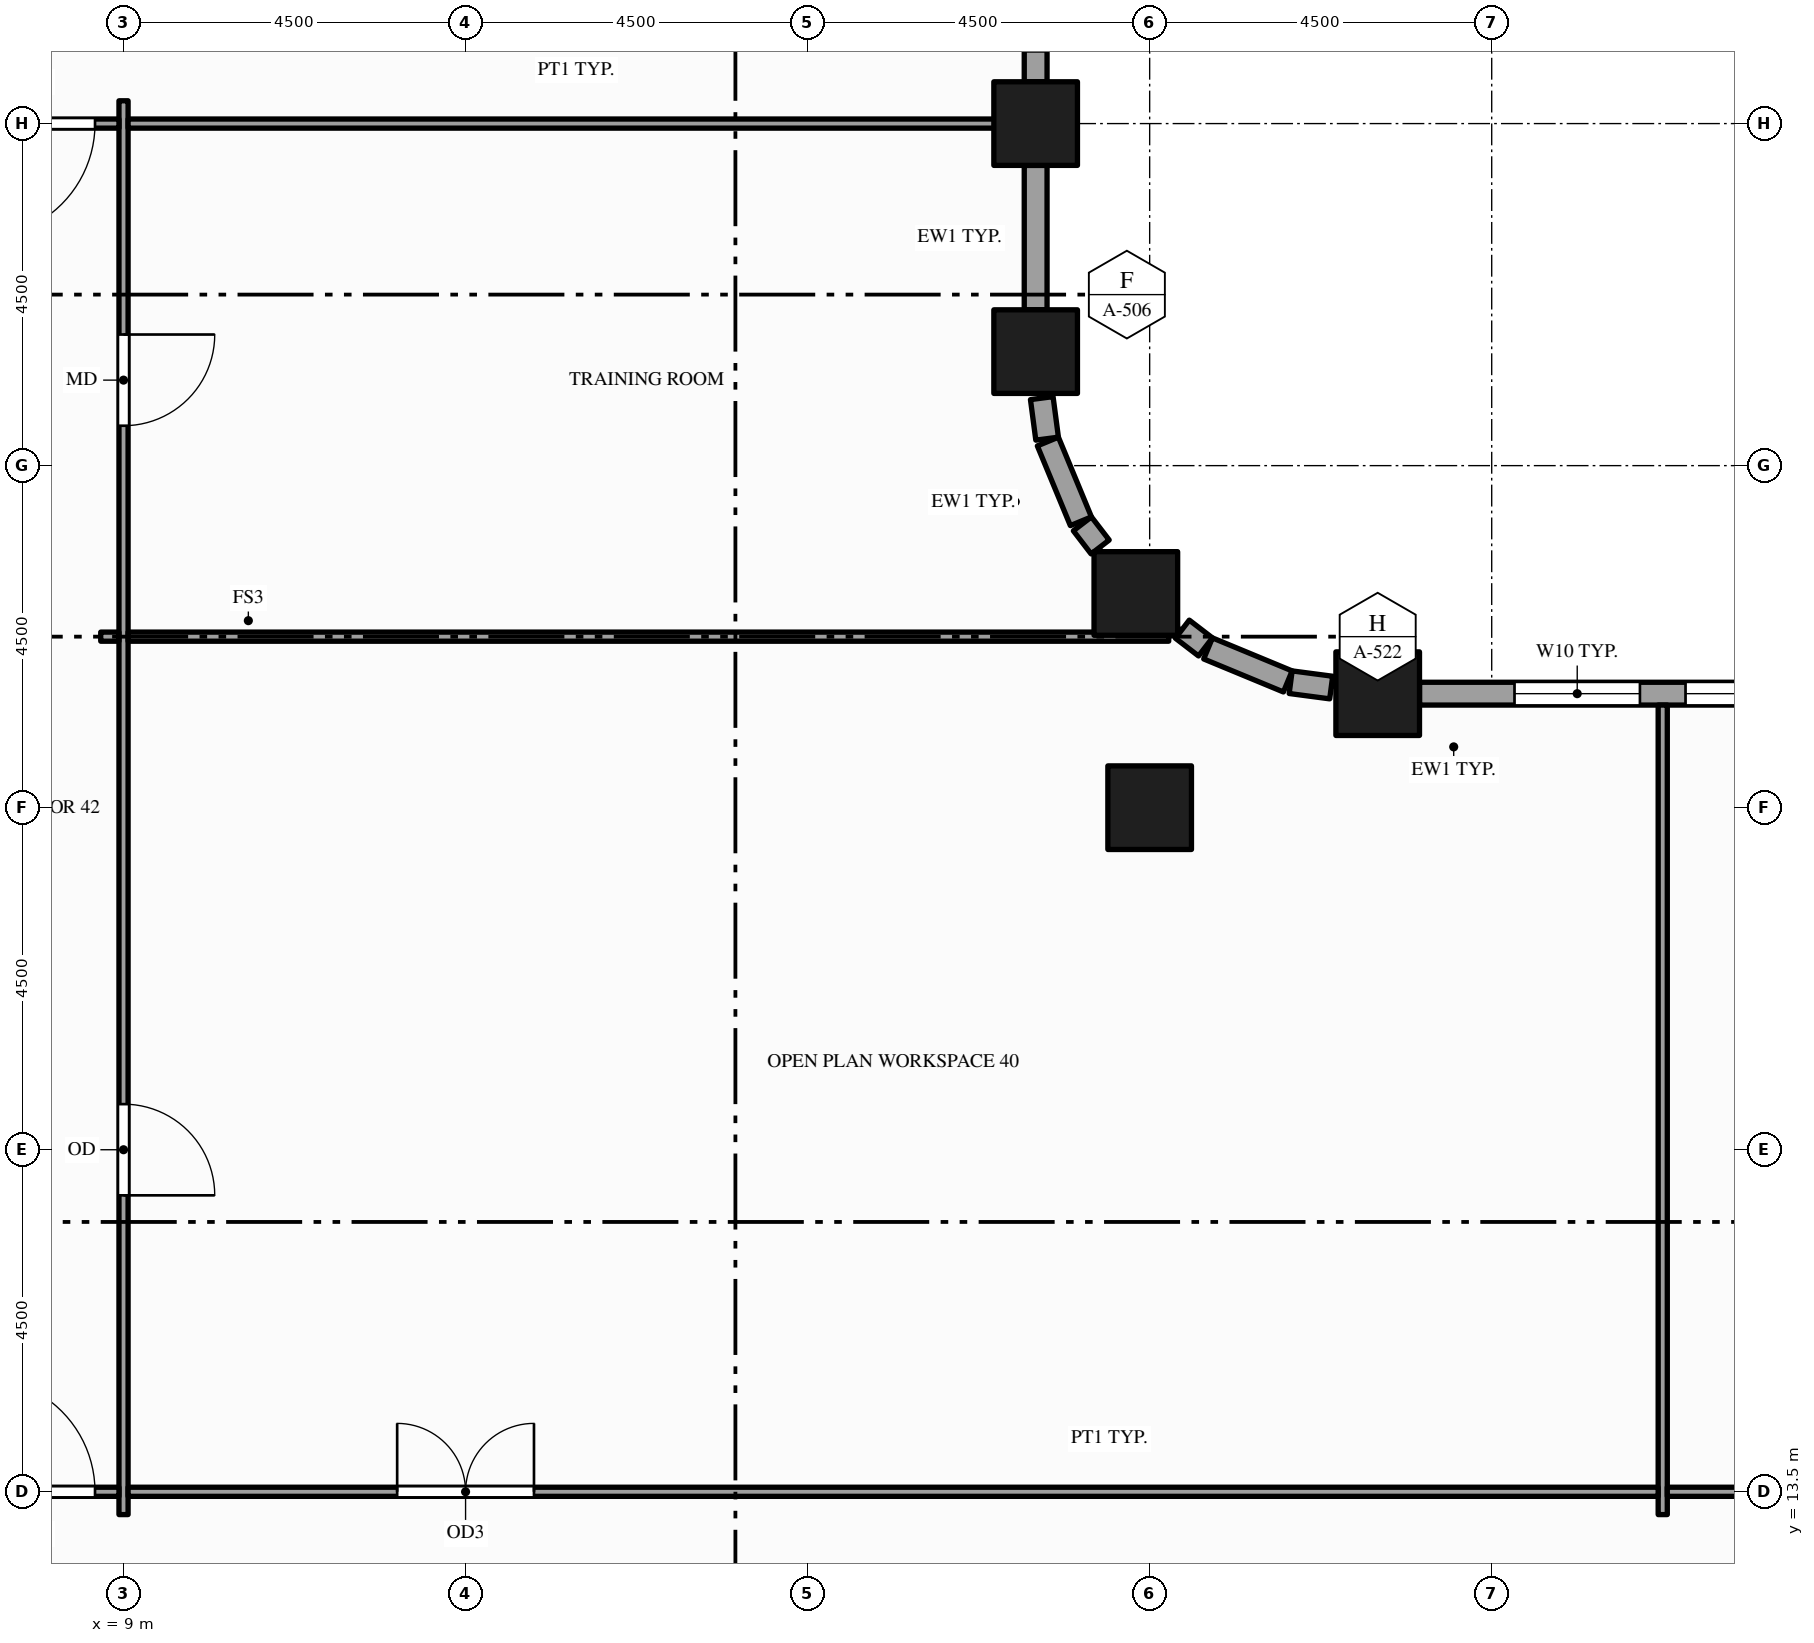
"""IFC4 building model, lengths in metres.
Left out: names, types, materials, properties, quantities, classifications, styles, units other than length and angle.
Written with IfcOpenShell. Run it as: python <this file> out.ifc"""

import sys

from ifc_helpers import new_model, si_unit, direction, frame, frame_2d, origin, origin_2d, place, context, subcontext, project, spatial, rectangle, hollow_rectangle, extrude, element, fill, save


model = new_model("IFC4")
c1 = context("Model", 3, precision=1e-05, world=origin(), true_north=direction((0.0, 1.0)))
c2 = subcontext(c1, "Body", "Model", "MODEL_VIEW")
j1 = project(units=[si_unit("LENGTHUNIT", "METRE"), si_unit("PLANEANGLEUNIT", "RADIAN")], contexts=[c1])
p1 = place(None, origin())
s1 = spatial("IfcSite", under=j1, at=p1, CompositionType="ELEMENT")
p2 = place(p1, origin())
s2 = spatial("IfcBuilding", under=s1, at=p2, CompositionType="ELEMENT")
p3 = place(p2, frame((0.0, 0.0, 41.0)))
s3 = spatial("IfcBuildingStorey", under=s2, at=p3, CompositionType="ELEMENT", Elevation=41.0)
for number, where, z_axis, x_axis in (
    (1, (21.0, 28.5, -0.15), (0.0, 0.0, 1.0), (1.0, 0.0, 0.0)),
    (2, (21.0, 31.5, -0.15), (0.0, 0.0, 1.0), (1.0, 0.0, 0.0)),
    (3, (22.318, 25.318, -0.15), (0.0, 0.0, 1.0), (1.0, 0.0, 0.0)),
    (4, (22.5, 22.5, -0.15), (0.0, 0.0, 1.0), (1.0, 0.0, 0.0)),
    (5, (25.5, 24.0, -0.15), (0.0, 0.0, 1.0), (1.0, 0.0, 0.0)),
):
    element("IfcColumn", number, at=place(p3, frame(where, z_axis=z_axis, x_axis=x_axis)), inside=s3, PredefinedType="COLUMN", context=c2, shape_type="SweptSolid", body=[
        extrude(hollow_rectangle(XDim=1.1, YDim=1.1, WallThickness=0.06, at=origin_2d()), origin(), (0.0, 0.0, 1.0), 4.0),
    ])
p4 = place(p3, frame((30.95, 24.0, 0.0), z_axis=(0.0, 0.0, 1.0), x_axis=(-1.0, 0.0, 0.0)))
e6 = element("IfcWall", 6, at=p4, inside=s3, PredefinedType="STANDARD", context=c2, shape_type="SweptSolid", body=[
    extrude(rectangle(XDim=4.9, YDim=0.3, at=frame_2d((2.45, 0.0))), origin(), (0.0, 0.0, 1.0), 3.144),
])
p5 = place(p4, frame((0.4, 0.0, 0.9)))
e7 = element("IfcOpeningElement", 7, at=p5, cuts=e6, PredefinedType="OPENING", context=c2, shape_type="SweptSolid", body=[
    extrude(rectangle(XDim=1.0, YDim=2.0, at=frame_2d((0.5, 1.0))), frame((0.0, 0.16, 0.0), z_axis=(0.0, -1.0, 0.0), x_axis=(1.0, 0.0, 0.0)), (0.0, 0.0, 1.0), 0.32),
])
p6 = place(p4, frame((2.0, 0.0, 0.9)))
e8 = element("IfcOpeningElement", 8, at=p6, cuts=e6, PredefinedType="OPENING", context=c2, shape_type="SweptSolid", body=[
    extrude(rectangle(XDim=1.65, YDim=2.0, at=frame_2d((0.825, 1.0))), frame((0.0, 0.16, 0.0), z_axis=(0.0, -1.0, 0.0), x_axis=(1.0, 0.0, 0.0)), (0.0, 0.0, 1.0), 0.32),
])
p7 = place(p3, frame((24.888, 24.081, 0.0), z_axis=(0.0, 0.0, 1.0), x_axis=(-0.991417173479, 0.130736330569, 0.0)))
e9 = element("IfcWall", 9, at=p7, inside=s3, PredefinedType="STANDARD", context=c2, shape_type="SweptSolid", body=[
    extrude(rectangle(XDim=0.538, YDim=0.3, at=frame_2d((0.269, 0.0))), origin(), (0.0, 0.0, 1.0), 2.938),
])
p8 = place(p3, frame((24.317, 24.161, 0.0), z_axis=(0.0, 0.0, 1.0), x_axis=(-0.923914616768, 0.382598720491, 0.0)))
e10 = element("IfcWall", 10, at=p8, inside=s3, PredefinedType="STANDARD", context=c2, shape_type="SweptSolid", body=[
    extrude(rectangle(XDim=1.135, YDim=0.3, at=frame_2d((0.568, 0.0))), origin(), (0.0, 0.0, 1.0), 3.144),
])
for number, where, z_axis, x_axis in (
    (11, (23.234, 24.615, 0.0), (0.0, 0.0, 1.0), (-0.794, 0.609, 0.0)),
    (12, (21.849, 25.93, 0.0), (0.0, 0.0, 1.0), (-0.609, 0.794, 0.0)),
):
    element("IfcWall", number, at=place(p3, frame(where, z_axis=z_axis, x_axis=x_axis)), inside=s3, PredefinedType="STANDARD", context=c2, shape_type="SweptSolid", body=[
        extrude(rectangle(XDim=0.384, YDim=0.3, at=frame_2d((0.192, 0.0))), origin(), (0.0, 0.0, 1.0), 3.144),
    ])
p9 = place(p3, frame((21.595, 26.268, 0.0), z_axis=(0.0, 0.0, 1.0), x_axis=(-0.382598720491, 0.923914616768, 0.0)))
e13 = element("IfcWall", 13, at=p9, inside=s3, PredefinedType="STANDARD", context=c2, shape_type="SweptSolid", body=[
    extrude(rectangle(XDim=1.135, YDim=0.3, at=frame_2d((0.568, 0.0))), origin(), (0.0, 0.0, 1.0), 3.144),
])
p10 = place(p3, frame((21.151, 27.355, 0.0), z_axis=(0.0, 0.0, 1.0), x_axis=(-0.130736330569, 0.991417173479, 0.0)))
e14 = element("IfcWall", 14, at=p10, inside=s3, PredefinedType="STANDARD", context=c2, shape_type="SweptSolid", body=[
    extrude(rectangle(XDim=0.538, YDim=0.3, at=frame_2d((0.269, 0.0))), origin(), (0.0, 0.0, 1.0), 3.144),
])
p11 = place(p3, frame((21.0, 29.05, 0.0), z_axis=(0.0, 0.0, 1.0), x_axis=(0.0, 1.0, 0.0)))
e15 = element("IfcWall", 15, at=p11, inside=s3, PredefinedType="STANDARD", context=c2, shape_type="SweptSolid", body=[
    extrude(rectangle(XDim=1.9, YDim=0.3, at=frame_2d((0.95, 0.0))), origin(), (0.0, 0.0, 1.0), 3.144),
])
p12 = place(p3, frame((21.0, 32.05, 0.0), z_axis=(0.0, 0.0, 1.0), x_axis=(0.0, 1.0, 0.0)))
e16 = element("IfcWall", 16, at=p12, inside=s3, PredefinedType="STANDARD", context=c2, shape_type="SweptSolid", body=[
    extrude(rectangle(XDim=3.95, YDim=0.3, at=frame_2d((1.975, 0.0))), origin(), (0.0, 0.0, 1.0), 3.144),
])
p13 = place(p12, frame((0.4, 0.0, 0.9)))
e17 = element("IfcOpeningElement", 17, at=p13, cuts=e16, PredefinedType="OPENING", context=c2, shape_type="SweptSolid", body=[
    extrude(rectangle(XDim=1.0, YDim=2.0, at=frame_2d((0.5, 1.0))), frame((0.0, 0.16, 0.0), z_axis=(0.0, -1.0, 0.0), x_axis=(1.0, 0.0, 0.0)), (0.0, 0.0, 1.0), 0.32),
])
p14 = place(p12, frame((2.0, 0.0, 0.9)))
e18 = element("IfcOpeningElement", 18, at=p14, cuts=e16, PredefinedType="OPENING", context=c2, shape_type="SweptSolid", body=[
    extrude(rectangle(XDim=1.55, YDim=2.0, at=frame_2d((0.775, 1.0))), frame((0.0, 0.16, 0.0), z_axis=(0.0, -1.0, 0.0), x_axis=(1.0, 0.0, 0.0)), (0.0, 0.0, 1.0), 0.32),
])
p15 = place(p3, frame((9.0, 13.2, 0.0), z_axis=(0.0, 0.0, 1.0), x_axis=(0.0, 1.0, 0.0)))
e19 = element("IfcWall", 19, at=p15, inside=s3, PredefinedType="PARTITIONING", context=c2, shape_type="SweptSolid", body=[
    extrude(rectangle(XDim=18.6, YDim=0.12, at=frame_2d((9.3, 0.0))), origin(), (0.0, 0.0, 1.0), 2.6),
])
p16 = place(p15, frame((14.325, 0.0, 0.0)))
e20 = element("IfcOpeningElement", 20, at=p16, cuts=e19, PredefinedType="OPENING", context=c2, shape_type="SweptSolid", body=[
    extrude(rectangle(XDim=1.2, YDim=2.1, at=frame_2d((0.6, 1.05))), frame((0.0, 0.07, 0.0), z_axis=(0.0, -1.0, 0.0), x_axis=(1.0, 0.0, 0.0)), (0.0, 0.0, 1.0), 0.14),
])
p17 = place(p15, frame((4.2, 0.0, 0.0)))
e21 = element("IfcOpeningElement", 21, at=p17, cuts=e19, PredefinedType="OPENING", context=c2, shape_type="SweptSolid", body=[
    extrude(rectangle(XDim=1.2, YDim=2.1, at=frame_2d((0.6, 1.05))), frame((0.0, 0.07, 0.0), z_axis=(0.0, -1.0, 0.0), x_axis=(1.0, 0.0, 0.0)), (0.0, 0.0, 1.0), 0.14),
])
p18 = place(p3, frame((29.25, 13.2, 0.0), z_axis=(0.0, 0.0, 1.0), x_axis=(0.0, 1.0, 0.0)))
e22 = element("IfcWall", 22, at=p18, inside=s3, PredefinedType="PARTITIONING", context=c2, shape_type="SweptSolid", body=[
    extrude(rectangle(XDim=10.65, YDim=0.12, at=frame_2d((5.325, 0.0))), origin(), (0.0, 0.0, 1.0), 2.938),
])
p19 = place(p3, frame((6.81, 13.5, 0.0), z_axis=(0.0, 0.0, 1.0), x_axis=(1.0, 0.0, 0.0)))
e23 = element("IfcWall", 23, at=p19, inside=s3, PredefinedType="PARTITIONING", context=c2, shape_type="SweptSolid", body=[
    extrude(rectangle(XDim=2.13, YDim=0.12, at=frame_2d((1.065, 0.0))), origin(), (0.0, 0.0, 1.0), 2.938),
])
p20 = place(p19, frame((0.315, 0.0, 0.0)))
e24 = element("IfcOpeningElement", 24, at=p20, cuts=e23, PredefinedType="OPENING", context=c2, shape_type="SweptSolid", body=[
    extrude(rectangle(XDim=1.5, YDim=2.1, at=frame_2d((0.75, 1.05))), frame((0.0, 0.07, 0.0), z_axis=(0.0, -1.0, 0.0), x_axis=(1.0, 0.0, 0.0)), (0.0, 0.0, 1.0), 0.14),
])
p21 = place(p3, frame((9.06, 13.5, 0.0), z_axis=(0.0, 0.0, 1.0), x_axis=(1.0, 0.0, 0.0)))
e25 = element("IfcWall", 25, at=p21, inside=s3, PredefinedType="PARTITIONING", context=c2, shape_type="SweptSolid", body=[
    extrude(rectangle(XDim=20.13, YDim=0.12, at=frame_2d((10.065, 0.0))), origin(), (0.0, 0.0, 1.0), 2.938),
])
p22 = place(p21, frame((3.54, 0.0, 0.0)))
e26 = element("IfcOpeningElement", 26, at=p22, cuts=e25, PredefinedType="OPENING", context=c2, shape_type="SweptSolid", body=[
    extrude(rectangle(XDim=1.8, YDim=2.1, at=frame_2d((0.9, 1.05))), frame((0.0, 0.07, 0.0), z_axis=(0.0, -1.0, 0.0), x_axis=(1.0, 0.0, 0.0)), (0.0, 0.0, 1.0), 0.14),
])
p23 = place(p3, frame((29.31, 13.5, 0.0), z_axis=(0.0, 0.0, 1.0), x_axis=(1.0, 0.0, 0.0)))
e27 = element("IfcWall", 27, at=p23, inside=s3, PredefinedType="PARTITIONING", context=c2, shape_type="SweptSolid", body=[
    extrude(rectangle(XDim=8.88, YDim=0.12, at=frame_2d((4.44, 0.0))), origin(), (0.0, 0.0, 1.0), 2.938),
])
p24 = place(p23, frame((3.84, 0.0, 0.0)))
e28 = element("IfcOpeningElement", 28, at=p24, cuts=e27, PredefinedType="OPENING", context=c2, shape_type="SweptSolid", body=[
    extrude(rectangle(XDim=1.2, YDim=2.1, at=frame_2d((0.6, 1.05))), frame((0.0, 0.07, 0.0), z_axis=(0.0, -1.0, 0.0), x_axis=(1.0, 0.0, 0.0)), (0.0, 0.0, 1.0), 0.14),
])
p25 = place(p3, frame((8.7, 24.75, 0.0), z_axis=(0.0, 0.0, 1.0), x_axis=(1.0, 0.0, 0.0)))
e29 = element("IfcWall", 29, at=p25, inside=s3, PredefinedType="PARTITIONING", context=c2, shape_type="SweptSolid", body=[
    extrude(rectangle(XDim=0.24, YDim=0.12, at=frame_2d((0.12, 0.0))), origin(), (0.0, 0.0, 1.0), 2.938),
])
p26 = place(p3, frame((9.06, 24.75, 0.0), z_axis=(0.0, 0.0, 1.0), x_axis=(1.0, 0.0, 0.0)))
e30 = element("IfcWall", 30, at=p26, inside=s3, PredefinedType="PARTITIONING", context=c2, shape_type="SweptSolid", body=[
    extrude(rectangle(XDim=13.69, YDim=0.12, at=frame_2d((6.845, 0.0))), origin(), (0.0, 0.0, 1.0), 2.938),
])
p27 = place(p3, frame((6.81, 31.5, 0.0), z_axis=(0.0, 0.0, 1.0), x_axis=(1.0, 0.0, 0.0)))
e31 = element("IfcWall", 31, at=p27, inside=s3, PredefinedType="PARTITIONING", context=c2, shape_type="SweptSolid", body=[
    extrude(rectangle(XDim=2.13, YDim=0.12, at=frame_2d((1.065, 0.0))), origin(), (0.0, 0.0, 1.0), 2.938),
])
p28 = place(p27, frame((0.315, 0.0, 0.0)))
e32 = element("IfcOpeningElement", 32, at=p28, cuts=e31, PredefinedType="OPENING", context=c2, shape_type="SweptSolid", body=[
    extrude(rectangle(XDim=1.5, YDim=2.1, at=frame_2d((0.75, 1.05))), frame((0.0, 0.07, 0.0), z_axis=(0.0, -1.0, 0.0), x_axis=(1.0, 0.0, 0.0)), (0.0, 0.0, 1.0), 0.14),
])
p29 = place(p3, frame((9.06, 31.5, 0.0), z_axis=(0.0, 0.0, 1.0), x_axis=(1.0, 0.0, 0.0)))
e33 = element("IfcWall", 33, at=p29, inside=s3, PredefinedType="PARTITIONING", context=c2, shape_type="SweptSolid", body=[
    extrude(rectangle(XDim=11.79, YDim=0.12, at=frame_2d((5.895, 0.0))), origin(), (0.0, 0.0, 1.0), 2.938),
])
p30 = place(p5, origin())
e34 = element("IfcWindow", 34, at=p30, inside=s3, PartitioningType="SINGLE_PANEL", PredefinedType="WINDOW", context=c2, shape_type="SweptSolid", body=[
    extrude(rectangle(XDim=1.0, YDim=2.0, at=frame_2d((0.5, 1.0))), frame((0.0, 0.03, 0.0), z_axis=(0.0, -1.0, 0.0), x_axis=(1.0, 0.0, 0.0)), (0.0, 0.0, 1.0), 0.06),
])
fill(e7, e34)
p31 = place(p6, origin())
e35 = element("IfcWindow", 35, at=p31, inside=s3, PartitioningType="SINGLE_PANEL", PredefinedType="WINDOW", context=c2, shape_type="SweptSolid", body=[
    extrude(rectangle(XDim=1.65, YDim=2.0, at=frame_2d((0.825, 1.0))), frame((0.0, 0.03, 0.0), z_axis=(0.0, -1.0, 0.0), x_axis=(1.0, 0.0, 0.0)), (0.0, 0.0, 1.0), 0.06),
])
fill(e8, e35)
p32 = place(p22, origin())
e36 = element("IfcDoor", 36, at=p32, inside=s3, OperationType="DOUBLE_DOOR_SINGLE_SWING", PredefinedType="DOOR", context=c2, shape_type="SweptSolid", body=[
    extrude(rectangle(XDim=1.8, YDim=2.1, at=frame_2d((0.9, 1.05))), frame((0.0, 0.025, 0.0), z_axis=(0.0, -1.0, 0.0), x_axis=(1.0, 0.0, 0.0)), (0.0, 0.0, 1.0), 0.05),
])
fill(e26, e36)
p33 = place(p20, origin())
e37 = element("IfcDoor", 37, at=p33, inside=s3, OperationType="SINGLE_SWING_LEFT", PredefinedType="DOOR", context=c2, shape_type="SweptSolid", body=[
    extrude(rectangle(XDim=1.5, YDim=2.1, at=frame_2d((0.75, 1.05))), frame((0.0, 0.025, 0.0), z_axis=(0.0, -1.0, 0.0), x_axis=(1.0, 0.0, 0.0)), (0.0, 0.0, 1.0), 0.05),
])
fill(e24, e37)
p34 = place(p28, origin())
e38 = element("IfcDoor", 38, at=p34, inside=s3, OperationType="SINGLE_SWING_LEFT", PredefinedType="DOOR", context=c2, shape_type="SweptSolid", body=[
    extrude(rectangle(XDim=1.5, YDim=2.1, at=frame_2d((0.75, 1.05))), frame((0.0, 0.025, 0.0), z_axis=(0.0, -1.0, 0.0), x_axis=(1.0, 0.0, 0.0)), (0.0, 0.0, 1.0), 0.05),
])
fill(e32, e38)
p35 = place(p16, origin())
e39 = element("IfcDoor", 39, at=p35, inside=s3, OperationType="SINGLE_SWING_RIGHT", PredefinedType="DOOR", context=c2, shape_type="SweptSolid", body=[
    extrude(rectangle(XDim=1.2, YDim=2.1, at=frame_2d((0.6, 1.05))), frame((0.0, 0.025, 0.0), z_axis=(0.0, -1.0, 0.0), x_axis=(1.0, 0.0, 0.0)), (0.0, 0.0, 1.0), 0.05),
])
fill(e20, e39)
p36 = place(p17, origin())
e40 = element("IfcDoor", 40, at=p36, inside=s3, OperationType="SINGLE_SWING_LEFT", PredefinedType="DOOR", context=c2, shape_type="SweptSolid", body=[
    extrude(rectangle(XDim=1.2, YDim=2.1, at=frame_2d((0.6, 1.05))), frame((0.0, 0.025, 0.0), z_axis=(0.0, -1.0, 0.0), x_axis=(1.0, 0.0, 0.0)), (0.0, 0.0, 1.0), 0.05),
])
fill(e21, e40)
save(model, sys.argv[1])
